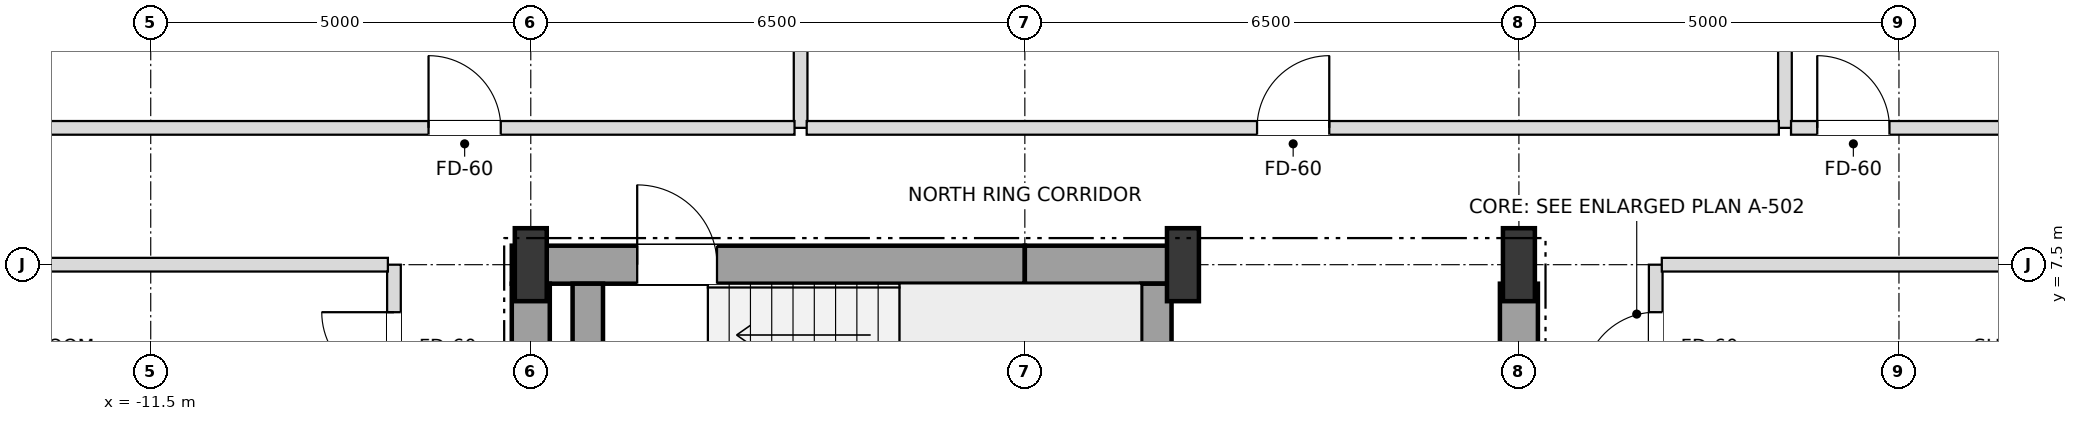
"""IFC4 building model, lengths in metres.
Left out: names, types, materials, properties, quantities, classifications, styles, units other than length and angle.
Written with IfcOpenShell. Run it as: python <this file> out.ifc"""

import sys

from ifc_helpers import new_model, si_unit, direction, frame, frame_2d, origin, origin_2d, place, context, subcontext, project, spatial, rectangle, i_section, extrude, element, fill, save


model = new_model("IFC4")
c1 = context("Model", 3, precision=1e-05, world=origin(), true_north=direction((0.0, 1.0)))
c2 = subcontext(c1, "Body", "Model", "MODEL_VIEW")
j1 = project(units=[si_unit("LENGTHUNIT", "METRE"), si_unit("PLANEANGLEUNIT", "RADIAN")], contexts=[c1])
p1 = place(None, origin())
s1 = spatial("IfcSite", under=j1, at=p1, CompositionType="ELEMENT")
p2 = place(p1, origin())
s2 = spatial("IfcBuilding", under=s1, at=p2, CompositionType="ELEMENT")
p3 = place(p2, frame((0.0, 0.0, 82.8)))
s3 = spatial("IfcBuildingStorey", under=s2, at=p3, CompositionType="ELEMENT", Elevation=82.8)
for number, where, z_axis, x_axis in (
    (1, (-6.5, 7.5, 0.0), (0.0, 0.0, 1.0), (1.0, 0.0, 0.0)),
    (2, (2.08, 7.5, 0.0), (0.0, 0.0, 1.0), (1.0, 0.0, 0.0)),
    (3, (6.5, 7.5, 0.0), (0.0, 0.0, 1.0), (1.0, 0.0, 0.0)),
):
    element("IfcColumn", number, at=place(p3, frame(where, z_axis=z_axis, x_axis=x_axis)), inside=s3, PredefinedType="COLUMN", context=c2, shape_type="SweptSolid", body=[
        extrude(i_section(OverallWidth=0.42, OverallDepth=0.96, WebThickness=0.022, FlangeThickness=0.034, at=origin_2d()), origin(), (0.0, 0.0, 1.0), 3.6),
    ])
p4 = place(p3, frame((-6.75, 7.5, 0.0), z_axis=(0.0, 0.0, 1.0), x_axis=(1.0, 0.0, 0.0)))
e4 = element("IfcWall", 4, at=p4, inside=s3, PredefinedType="SHEAR", context=c2, shape_type="SweptSolid", body=[
    extrude(rectangle(XDim=6.75, YDim=0.5, at=frame_2d((3.375, 0.0))), origin(), (0.0, 0.0, 1.0), 3.38),
])
p5 = place(p4, frame((1.65, 0.0, 0.0)))
e5 = element("IfcOpeningElement", 5, at=p5, cuts=e4, PredefinedType="OPENING", context=c2, shape_type="SweptSolid", body=[
    extrude(rectangle(XDim=1.05, YDim=2.15, at=frame_2d((0.525, 1.075))), frame((0.0, 0.26, 0.0), z_axis=(0.0, -1.0, 0.0), x_axis=(1.0, 0.0, 0.0)), (0.0, 0.0, 1.0), 0.52),
])
p6 = place(p3, frame((0.0, 7.5, 0.0), z_axis=(0.0, 0.0, 1.0), x_axis=(1.0, 0.0, 0.0)))
e6 = element("IfcWall", 6, at=p6, inside=s3, PredefinedType="SHEAR", context=c2, shape_type="SweptSolid", body=[
    extrude(rectangle(XDim=2.08, YDim=0.5, at=frame_2d((1.04, 0.0))), origin(), (0.0, 0.0, 1.0), 3.38),
])
for number, where, z_axis, x_axis in (
    (7, (-6.5, 3.95, 0.0), (0.0, 0.0, 1.0), (0.0, 1.0, 0.0)),
    (8, (6.5, 3.95, 0.0), (0.0, 0.0, 1.0), (0.0, 1.0, 0.0)),
):
    element("IfcWall", number, at=place(p3, frame(where, z_axis=z_axis, x_axis=x_axis)), inside=s3, PredefinedType="SHEAR", context=c2, shape_type="SweptSolid", body=[
        extrude(rectangle(XDim=3.3, YDim=0.5, at=frame_2d((1.65, 0.0))), origin(), (0.0, 0.0, 1.0), 3.38),
    ])
for number, where, z_axis, x_axis in (
    (9, (1.73, 3.95, 0.0), (0.0, 0.0, 1.0), (0.0, 1.0, 0.0)),
    (10, (-5.75, 3.95, 0.0), (0.0, 0.0, 1.0), (0.0, 1.0, 0.0)),
):
    element("IfcWall", number, at=place(p3, frame(where, z_axis=z_axis, x_axis=x_axis)), inside=s3, PredefinedType="SHEAR", context=c2, shape_type="SweptSolid", body=[
        extrude(rectangle(XDim=3.3, YDim=0.4, at=frame_2d((1.65, 0.0))), origin(), (0.0, 0.0, 1.0), 3.38),
    ])
p7 = place(p3, frame((-8.3, -7.5, 0.0), z_axis=(0.0, 0.0, 1.0), x_axis=(0.0, 1.0, 0.0)))
e11 = element("IfcWall", 11, at=p7, inside=s3, PredefinedType="PARTITIONING", context=c2, shape_type="SweptSolid", body=[
    extrude(rectangle(XDim=15.0, YDim=0.18, at=frame_2d((7.5, 0.0))), origin(), (0.0, 0.0, 1.0), 3.38),
])
p8 = place(p7, frame((2.075, 0.0, 0.0)))
e12 = element("IfcOpeningElement", 12, at=p8, cuts=e11, PredefinedType="OPENING", context=c2, shape_type="SweptSolid", body=[
    extrude(rectangle(XDim=0.95, YDim=2.15, at=frame_2d((0.475, 1.075))), frame((0.0, 0.1, 0.0), z_axis=(0.0, -1.0, 0.0), x_axis=(1.0, 0.0, 0.0)), (0.0, 0.0, 1.0), 0.2),
])
p9 = place(p7, frame((8.475, 0.0, 0.0)))
e13 = element("IfcOpeningElement", 13, at=p9, cuts=e11, PredefinedType="OPENING", context=c2, shape_type="SweptSolid", body=[
    extrude(rectangle(XDim=0.95, YDim=2.15, at=frame_2d((0.475, 1.075))), frame((0.0, 0.1, 0.0), z_axis=(0.0, -1.0, 0.0), x_axis=(1.0, 0.0, 0.0)), (0.0, 0.0, 1.0), 0.2),
])
p10 = place(p7, frame((13.425, 0.0, 0.0)))
e14 = element("IfcOpeningElement", 14, at=p10, cuts=e11, PredefinedType="OPENING", context=c2, shape_type="SweptSolid", body=[
    extrude(rectangle(XDim=0.95, YDim=2.15, at=frame_2d((0.475, 1.075))), frame((0.0, 0.1, 0.0), z_axis=(0.0, -1.0, 0.0), x_axis=(1.0, 0.0, 0.0)), (0.0, 0.0, 1.0), 0.2),
])
p11 = place(p3, frame((-2.95, 9.3, 0.0), z_axis=(0.0, 0.0, 1.0), x_axis=(0.0, 1.0, 0.0)))
e15 = element("IfcWall", 15, at=p11, inside=s3, PredefinedType="PARTITIONING", context=c2, shape_type="SweptSolid", body=[
    extrude(rectangle(XDim=15.6, YDim=0.18, at=frame_2d((7.8, 0.0))), origin(), (0.0, 0.0, 1.0), 2.816),
])
p12 = place(p3, frame((8.3, -7.5, 0.0), z_axis=(0.0, 0.0, 1.0), x_axis=(0.0, 1.0, 0.0)))
e16 = element("IfcWall", 16, at=p12, inside=s3, PredefinedType="PARTITIONING", context=c2, shape_type="SweptSolid", body=[
    extrude(rectangle(XDim=15.0, YDim=0.18, at=frame_2d((7.5, 0.0))), origin(), (0.0, 0.0, 1.0), 3.38),
])
p13 = place(p12, frame((2.075, 0.0, 0.0)))
e17 = element("IfcOpeningElement", 17, at=p13, cuts=e16, PredefinedType="OPENING", context=c2, shape_type="SweptSolid", body=[
    extrude(rectangle(XDim=0.95, YDim=2.15, at=frame_2d((0.475, 1.075))), frame((0.0, 0.1, 0.0), z_axis=(0.0, -1.0, 0.0), x_axis=(1.0, 0.0, 0.0)), (0.0, 0.0, 1.0), 0.2),
])
p14 = place(p12, frame((8.475, 0.0, 0.0)))
e18 = element("IfcOpeningElement", 18, at=p14, cuts=e16, PredefinedType="OPENING", context=c2, shape_type="SweptSolid", body=[
    extrude(rectangle(XDim=0.95, YDim=2.15, at=frame_2d((0.475, 1.075))), frame((0.0, 0.1, 0.0), z_axis=(0.0, -1.0, 0.0), x_axis=(1.0, 0.0, 0.0)), (0.0, 0.0, 1.0), 0.2),
])
p15 = place(p12, frame((13.425, 0.0, 0.0)))
e19 = element("IfcOpeningElement", 19, at=p15, cuts=e16, PredefinedType="OPENING", context=c2, shape_type="SweptSolid", body=[
    extrude(rectangle(XDim=0.95, YDim=2.15, at=frame_2d((0.475, 1.075))), frame((0.0, 0.1, 0.0), z_axis=(0.0, -1.0, 0.0), x_axis=(1.0, 0.0, 0.0)), (0.0, 0.0, 1.0), 0.2),
])
p16 = place(p3, frame((10.0, 9.3, 0.0), z_axis=(0.0, 0.0, 1.0), x_axis=(0.0, 1.0, 0.0)))
e20 = element("IfcWall", 20, at=p16, inside=s3, PredefinedType="PARTITIONING", context=c2, shape_type="SweptSolid", body=[
    extrude(rectangle(XDim=15.6, YDim=0.18, at=frame_2d((7.8, 0.0))), origin(), (0.0, 0.0, 1.0), 2.816),
])
for number, where, z_axis, x_axis in (
    (21, (-21.9, 7.5, 0.0), (0.0, 0.0, 1.0), (1.0, 0.0, 0.0)),
    (22, (8.38, 7.5, 0.0), (0.0, 0.0, 1.0), (1.0, 0.0, 0.0)),
):
    element("IfcWall", number, at=place(p3, frame(where, z_axis=z_axis, x_axis=x_axis)), inside=s3, PredefinedType="PARTITIONING", context=c2, shape_type="SweptSolid", body=[
        extrude(rectangle(XDim=13.52, YDim=0.18, at=frame_2d((6.76, 0.0))), origin(), (0.0, 0.0, 1.0), 2.816),
    ])
p17 = place(p3, frame((-18.4, 9.3, 0.0), z_axis=(0.0, 0.0, 1.0), x_axis=(1.0, 0.0, 0.0)))
e23 = element("IfcWall", 23, at=p17, inside=s3, PredefinedType="PARTITIONING", context=c2, shape_type="SweptSolid", body=[
    extrude(rectangle(XDim=15.37, YDim=0.18, at=frame_2d((7.685, 0.0))), origin(), (0.0, 0.0, 1.0), 2.816),
])
p18 = place(p17, frame((10.555, 0.0, 0.0)))
e24 = element("IfcOpeningElement", 24, at=p18, cuts=e23, PredefinedType="OPENING", context=c2, shape_type="SweptSolid", body=[
    extrude(rectangle(XDim=0.95, YDim=2.15, at=frame_2d((0.475, 1.075))), frame((0.0, 0.1, 0.0), z_axis=(0.0, -1.0, 0.0), x_axis=(1.0, 0.0, 0.0)), (0.0, 0.0, 1.0), 0.2),
])
p19 = place(p3, frame((-2.87, 9.3, 0.0), z_axis=(0.0, 0.0, 1.0), x_axis=(1.0, 0.0, 0.0)))
e25 = element("IfcWall", 25, at=p19, inside=s3, PredefinedType="PARTITIONING", context=c2, shape_type="SweptSolid", body=[
    extrude(rectangle(XDim=12.79, YDim=0.18, at=frame_2d((6.395, 0.0))), origin(), (0.0, 0.0, 1.0), 2.816),
])
p20 = place(p19, frame((5.925, 0.0, 0.0)))
e26 = element("IfcOpeningElement", 26, at=p20, cuts=e25, PredefinedType="OPENING", context=c2, shape_type="SweptSolid", body=[
    extrude(rectangle(XDim=0.95, YDim=2.15, at=frame_2d((0.475, 1.075))), frame((0.0, 0.1, 0.0), z_axis=(0.0, -1.0, 0.0), x_axis=(1.0, 0.0, 0.0)), (0.0, 0.0, 1.0), 0.2),
])
p21 = place(p3, frame((10.08, 9.3, 0.0), z_axis=(0.0, 0.0, 1.0), x_axis=(1.0, 0.0, 0.0)))
e27 = element("IfcWall", 27, at=p21, inside=s3, PredefinedType="PARTITIONING", context=c2, shape_type="SweptSolid", body=[
    extrude(rectangle(XDim=8.32, YDim=0.18, at=frame_2d((4.16, 0.0))), origin(), (0.0, 0.0, 1.0), 2.816),
])
p22 = place(p21, frame((0.345, 0.0, 0.0)))
e28 = element("IfcOpeningElement", 28, at=p22, cuts=e27, PredefinedType="OPENING", context=c2, shape_type="SweptSolid", body=[
    extrude(rectangle(XDim=0.95, YDim=2.15, at=frame_2d((0.475, 1.075))), frame((0.0, 0.1, 0.0), z_axis=(0.0, -1.0, 0.0), x_axis=(1.0, 0.0, 0.0)), (0.0, 0.0, 1.0), 0.2),
])
p23 = place(p5, origin())
e29 = element("IfcDoor", 29, at=p23, inside=s3, OperationType="SINGLE_SWING_LEFT", PredefinedType="DOOR", context=c2, shape_type="SweptSolid", body=[
    extrude(rectangle(XDim=1.05, YDim=2.15, at=frame_2d((0.525, 1.075))), frame((0.0, 0.025, 0.0), z_axis=(0.0, -1.0, 0.0), x_axis=(1.0, 0.0, 0.0)), (0.0, 0.0, 1.0), 0.05),
])
fill(e5, e29)
p24 = place(p18, origin())
e30 = element("IfcDoor", 30, at=p24, inside=s3, OperationType="SINGLE_SWING_LEFT", PredefinedType="DOOR", context=c2, shape_type="SweptSolid", body=[
    extrude(rectangle(XDim=0.95, YDim=2.15, at=frame_2d((0.475, 1.075))), frame((0.0, 0.025, 0.0), z_axis=(0.0, -1.0, 0.0), x_axis=(1.0, 0.0, 0.0)), (0.0, 0.0, 1.0), 0.05),
])
fill(e24, e30)
p25 = place(p20, origin())
e31 = element("IfcDoor", 31, at=p25, inside=s3, OperationType="SINGLE_SWING_RIGHT", PredefinedType="DOOR", context=c2, shape_type="SweptSolid", body=[
    extrude(rectangle(XDim=0.95, YDim=2.15, at=frame_2d((0.475, 1.075))), frame((0.0, 0.025, 0.0), z_axis=(0.0, -1.0, 0.0), x_axis=(1.0, 0.0, 0.0)), (0.0, 0.0, 1.0), 0.05),
])
fill(e26, e31)
p26 = place(p22, origin())
e32 = element("IfcDoor", 32, at=p26, inside=s3, OperationType="SINGLE_SWING_LEFT", PredefinedType="DOOR", context=c2, shape_type="SweptSolid", body=[
    extrude(rectangle(XDim=0.95, YDim=2.15, at=frame_2d((0.475, 1.075))), frame((0.0, 0.025, 0.0), z_axis=(0.0, -1.0, 0.0), x_axis=(1.0, 0.0, 0.0)), (0.0, 0.0, 1.0), 0.05),
])
fill(e28, e32)
p27 = place(p10, origin())
e33 = element("IfcDoor", 33, at=p27, inside=s3, OperationType="SINGLE_SWING_RIGHT", PredefinedType="DOOR", context=c2, shape_type="SweptSolid", body=[
    extrude(rectangle(XDim=0.95, YDim=2.15, at=frame_2d((0.475, 1.075))), frame((0.0, 0.025, 0.0), z_axis=(0.0, -1.0, 0.0), x_axis=(1.0, 0.0, 0.0)), (0.0, 0.0, 1.0), 0.05),
])
fill(e14, e33)
p28 = place(p15, origin())
e34 = element("IfcDoor", 34, at=p28, inside=s3, OperationType="SINGLE_SWING_LEFT", PredefinedType="DOOR", context=c2, shape_type="SweptSolid", body=[
    extrude(rectangle(XDim=0.95, YDim=2.15, at=frame_2d((0.475, 1.075))), frame((0.0, 0.025, 0.0), z_axis=(0.0, -1.0, 0.0), x_axis=(1.0, 0.0, 0.0)), (0.0, 0.0, 1.0), 0.05),
])
fill(e19, e34)
save(model, sys.argv[1])
